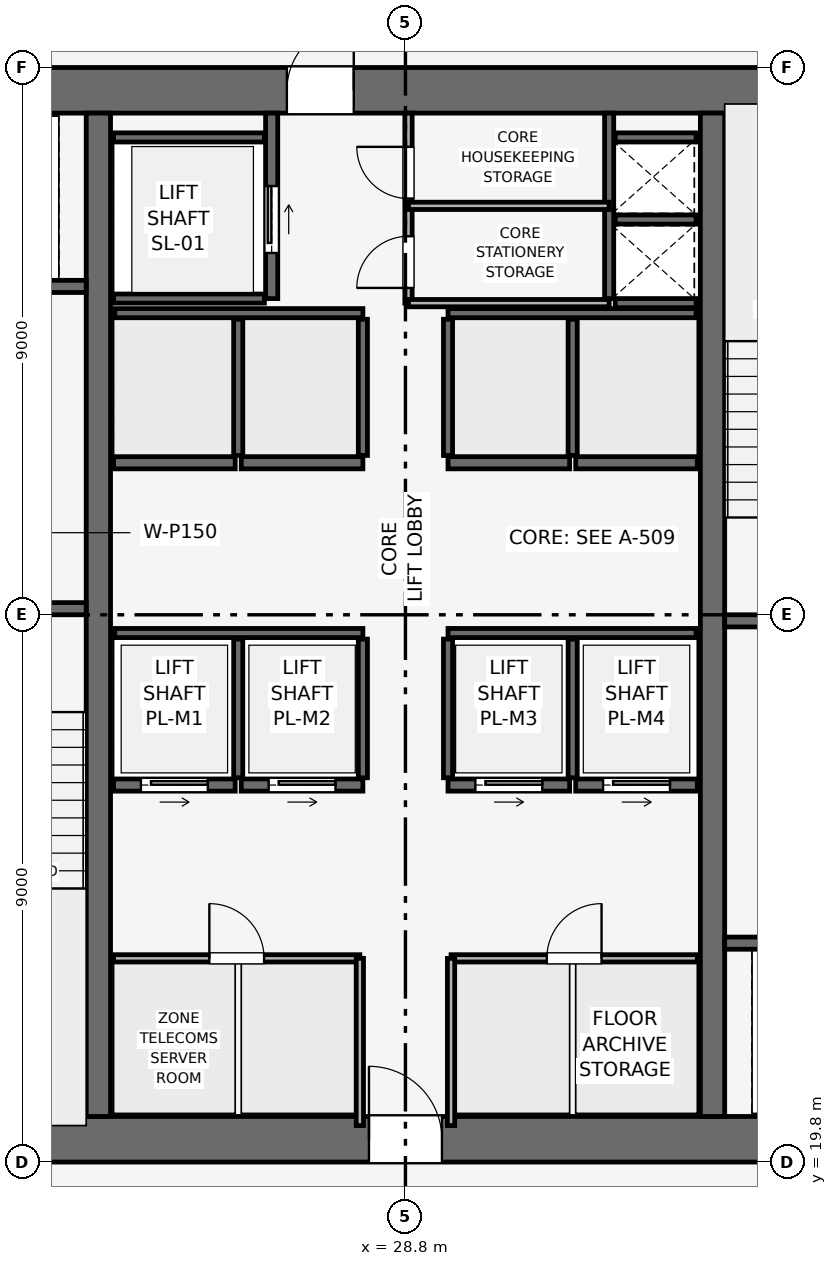
"""IFC4 building model, lengths in metres.
Left out: names, types, materials, properties, quantities, classifications, styles, units other than length and angle.
Written with IfcOpenShell. Run it as: python <this file> out.ifc"""

import sys

from ifc_helpers import new_model, si_unit, direction, frame, frame_2d, origin, place, context, subcontext, project, spatial, rectangle, extrude, element, fill, save


model = new_model("IFC4")
c1 = context("Model", 3, precision=1e-05, world=origin(), true_north=direction((0.0, 1.0)))
c2 = subcontext(c1, "Body", "Model", "MODEL_VIEW")
j1 = project(units=[si_unit("LENGTHUNIT", "METRE"), si_unit("PLANEANGLEUNIT", "RADIAN")], contexts=[c1])
p1 = place(None, origin())
s1 = spatial("IfcSite", under=j1, at=p1, CompositionType="ELEMENT")
p2 = place(p1, origin())
s2 = spatial("IfcBuilding", under=s1, at=p2, CompositionType="ELEMENT")
p3 = place(p2, frame((0.0, 0.0, 199.95)))
s3 = spatial("IfcBuildingStorey", under=s2, at=p3, CompositionType="ELEMENT", Elevation=199.95)
p4 = place(p3, frame((19.8, 20.175, 0.0), z_axis=(0.0, 0.0, 1.0), x_axis=(1.0, 0.0, 0.0)))
e1 = element("IfcWall", 1, at=p4, inside=s3, PredefinedType="SHEAR", context=c2, shape_type="SweptSolid", body=[
    extrude(rectangle(XDim=18.0, YDim=0.75, at=frame_2d((9.0, 0.0))), origin(), (0.0, 0.0, 1.0), 3.75),
])
p5 = place(p4, frame((8.4, 0.0, 0.0)))
e2 = element("IfcOpeningElement", 2, at=p5, cuts=e1, PredefinedType="OPENING", context=c2, shape_type="SweptSolid", body=[
    extrude(rectangle(XDim=1.2, YDim=2.2, at=frame_2d((0.6, 1.1))), frame((0.0, 0.385, 0.0), z_axis=(0.0, -1.0, 0.0), x_axis=(1.0, 0.0, 0.0)), (0.0, 0.0, 1.0), 0.77),
])
p6 = place(p3, frame((19.8, 37.425, 0.0), z_axis=(0.0, 0.0, 1.0), x_axis=(1.0, 0.0, 0.0)))
e3 = element("IfcWall", 3, at=p6, inside=s3, PredefinedType="SHEAR", context=c2, shape_type="SweptSolid", body=[
    extrude(rectangle(XDim=18.0, YDim=0.75, at=frame_2d((9.0, 0.0))), origin(), (0.0, 0.0, 1.0), 3.75),
])
p7 = place(p6, frame((7.05, 0.0, 0.0)))
e4 = element("IfcOpeningElement", 4, at=p7, cuts=e3, PredefinedType="OPENING", context=c2, shape_type="SweptSolid", body=[
    extrude(rectangle(XDim=1.1, YDim=2.15, at=frame_2d((0.55, 1.075))), frame((0.0, 0.385, 0.0), z_axis=(0.0, -1.0, 0.0), x_axis=(1.0, 0.0, 0.0)), (0.0, 0.0, 1.0), 0.77),
])
for number, where, z_axis, x_axis in (
    (5, (23.75, 20.55, 0.0), (0.0, 0.0, 1.0), (0.0, 1.0, 0.0)),
    (6, (33.85, 20.55, 0.0), (0.0, 0.0, 1.0), (0.0, 1.0, 0.0)),
):
    element("IfcWall", number, at=place(p3, frame(where, z_axis=z_axis, x_axis=x_axis)), inside=s3, PredefinedType="SHEAR", context=c2, shape_type="SweptSolid", body=[
        extrude(rectangle(XDim=16.5, YDim=0.4, at=frame_2d((8.25, 0.0))), origin(), (0.0, 0.0, 1.0), 3.75),
    ])
p8 = place(p3, frame((20.4, 28.9, 0.0), z_axis=(0.0, 0.0, 1.0), x_axis=(1.0, 0.0, 0.0)))
e7 = element("IfcWall", 7, at=p8, inside=s3, PredefinedType="SHEAR", context=c2, shape_type="SweptSolid", body=[
    extrude(rectangle(XDim=3.15, YDim=0.2, at=frame_2d((1.575, 0.0))), origin(), (0.0, 0.0, 1.0), 3.5),
])
p9 = place(p8, frame((0.8, 0.0, 0.0)))
e8 = element("IfcOpeningElement", 8, at=p9, cuts=e7, PredefinedType="OPENING", context=c2, shape_type="SweptSolid", body=[
    extrude(rectangle(XDim=1.0, YDim=2.1, at=frame_2d((0.5, 1.05))), frame((0.0, 0.11, 0.0), z_axis=(0.0, -1.0, 0.0), x_axis=(1.0, 0.0, 0.0)), (0.0, 0.0, 1.0), 0.22),
])
p10 = place(p3, frame((34.05, 28.7, 0.0), z_axis=(0.0, 0.0, 1.0), x_axis=(1.0, 0.0, 0.0)))
e9 = element("IfcWall", 9, at=p10, inside=s3, PredefinedType="SHEAR", context=c2, shape_type="SweptSolid", body=[
    extrude(rectangle(XDim=3.15, YDim=0.2, at=frame_2d((1.575, 0.0))), origin(), (0.0, 0.0, 1.0), 3.5),
])
p11 = place(p10, frame((0.8, 0.0, 0.0)))
e10 = element("IfcOpeningElement", 10, at=p11, cuts=e9, PredefinedType="OPENING", context=c2, shape_type="SweptSolid", body=[
    extrude(rectangle(XDim=1.0, YDim=2.1, at=frame_2d((0.5, 1.05))), frame((0.0, 0.11, 0.0), z_axis=(0.0, -1.0, 0.0), x_axis=(1.0, 0.0, 0.0)), (0.0, 0.0, 1.0), 0.22),
])
p12 = place(p3, frame((32.15, 34.0, 0.0), z_axis=(0.0, 0.0, 1.0), x_axis=(0.0, 1.0, 0.0)))
e11 = element("IfcWall", 11, at=p12, inside=s3, PredefinedType="SHEAR", context=c2, shape_type="SweptSolid", body=[
    extrude(rectangle(XDim=3.05, YDim=0.15, at=frame_2d((1.525, 0.0))), origin(), (0.0, 0.0, 1.0), 3.5),
])
for number, where, z_axis, x_axis in (
    (12, (32.25, 33.925, 0.0), (0.0, 0.0, 1.0), (1.0, 0.0, 0.0)),
    (13, (32.25, 35.3, 0.0), (0.0, 0.0, 1.0), (1.0, 0.0, 0.0)),
):
    element("IfcWall", number, at=place(p3, frame(where, z_axis=z_axis, x_axis=x_axis)), inside=s3, PredefinedType="SHEAR", context=c2, shape_type="SweptSolid", body=[
        extrude(rectangle(XDim=1.33, YDim=0.15, at=frame_2d((0.665, 0.0))), origin(), (0.0, 0.0, 1.0), 3.5),
    ])
p13 = place(p3, frame((20.5, 34.2, 0.0), z_axis=(0.0, 0.0, 1.0), x_axis=(1.0, 0.0, 0.0)))
e14 = element("IfcWall", 14, at=p13, inside=s3, PredefinedType="SHEAR", context=c2, shape_type="SweptSolid", body=[
    extrude(rectangle(XDim=3.05, YDim=0.2, at=frame_2d((1.525, 0.0))), origin(), (0.0, 0.0, 1.0), 3.5),
])
p14 = place(p13, frame((0.75, 0.0, 0.0)))
e15 = element("IfcOpeningElement", 15, at=p14, cuts=e14, PredefinedType="OPENING", context=c2, shape_type="SweptSolid", body=[
    extrude(rectangle(XDim=1.1, YDim=2.15, at=frame_2d((0.55, 1.075))), frame((0.0, 0.11, 0.0), z_axis=(0.0, -1.0, 0.0), x_axis=(1.0, 0.0, 0.0)), (0.0, 0.0, 1.0), 0.22),
])
p15 = place(p3, frame((34.05, 23.4, 0.0), z_axis=(0.0, 0.0, 1.0), x_axis=(1.0, 0.0, 0.0)))
e16 = element("IfcWall", 16, at=p15, inside=s3, PredefinedType="SHEAR", context=c2, shape_type="SweptSolid", body=[
    extrude(rectangle(XDim=3.05, YDim=0.2, at=frame_2d((1.525, 0.0))), origin(), (0.0, 0.0, 1.0), 3.5),
])
p16 = place(p15, frame((1.2, 0.0, 0.0)))
e17 = element("IfcOpeningElement", 17, at=p16, cuts=e16, PredefinedType="OPENING", context=c2, shape_type="SweptSolid", body=[
    extrude(rectangle(XDim=1.1, YDim=2.15, at=frame_2d((0.55, 1.075))), frame((0.0, 0.11, 0.0), z_axis=(0.0, -1.0, 0.0), x_axis=(1.0, 0.0, 0.0)), (0.0, 0.0, 1.0), 0.22),
])
p17 = place(p3, frame((26.6, 34.0, 0.0), z_axis=(0.0, 0.0, 1.0), x_axis=(0.0, 1.0, 0.0)))
e18 = element("IfcWall", 18, at=p17, inside=s3, PredefinedType="SHEAR", context=c2, shape_type="SweptSolid", body=[
    extrude(rectangle(XDim=3.05, YDim=0.2, at=frame_2d((1.525, 0.0))), origin(), (0.0, 0.0, 1.0), 3.5),
])
p18 = place(p17, frame((0.75, 0.0, 0.0)))
e19 = element("IfcOpeningElement", 19, at=p18, cuts=e18, PredefinedType="OPENING", context=c2, shape_type="SweptSolid", body=[
    extrude(rectangle(XDim=1.1, YDim=2.15, at=frame_2d((0.55, 1.075))), frame((0.0, 0.11, 0.0), z_axis=(0.0, -1.0, 0.0), x_axis=(1.0, 0.0, 0.0)), (0.0, 0.0, 1.0), 0.22),
])
for number, where, z_axis, x_axis in (
    (20, (24.0, 34.0, 0.0), (0.0, 0.0, 1.0), (1.0, 0.0, 0.0)),
    (21, (24.0, 36.65, 0.0), (0.0, 0.0, 1.0), (1.0, 0.0, 0.0)),
):
    element("IfcWall", number, at=place(p3, frame(where, z_axis=z_axis, x_axis=x_axis)), inside=s3, PredefinedType="SHEAR", context=c2, shape_type="SweptSolid", body=[
        extrude(rectangle(XDim=2.48, YDim=0.15, at=frame_2d((1.24, 0.0))), origin(), (0.0, 0.0, 1.0), 3.5),
    ])
p19 = place(p3, frame((24.0, 26.0, 0.0), z_axis=(0.0, 0.0, 1.0), x_axis=(1.0, 0.0, 0.0)))
e22 = element("IfcWall", 22, at=p19, inside=s3, PredefinedType="SHEAR", context=c2, shape_type="SweptSolid", body=[
    extrude(rectangle(XDim=2.0, YDim=0.2, at=frame_2d((1.0, 0.0))), origin(), (0.0, 0.0, 1.0), 3.5),
])
p20 = place(p19, frame((0.45, 0.0, 0.0)))
e23 = element("IfcOpeningElement", 23, at=p20, cuts=e22, PredefinedType="OPENING", context=c2, shape_type="SweptSolid", body=[
    extrude(rectangle(XDim=1.1, YDim=2.15, at=frame_2d((0.55, 1.075))), frame((0.0, 0.11, 0.0), z_axis=(0.0, -1.0, 0.0), x_axis=(1.0, 0.0, 0.0)), (0.0, 0.0, 1.0), 0.22),
])
p21 = place(p3, frame((26.1, 26.0, 0.0), z_axis=(0.0, 0.0, 1.0), x_axis=(1.0, 0.0, 0.0)))
e24 = element("IfcWall", 24, at=p21, inside=s3, PredefinedType="SHEAR", context=c2, shape_type="SweptSolid", body=[
    extrude(rectangle(XDim=2.0, YDim=0.2, at=frame_2d((1.0, 0.0))), origin(), (0.0, 0.0, 1.0), 3.5),
])
p22 = place(p21, frame((0.45, 0.0, 0.0)))
e25 = element("IfcOpeningElement", 25, at=p22, cuts=e24, PredefinedType="OPENING", context=c2, shape_type="SweptSolid", body=[
    extrude(rectangle(XDim=1.1, YDim=2.15, at=frame_2d((0.55, 1.075))), frame((0.0, 0.11, 0.0), z_axis=(0.0, -1.0, 0.0), x_axis=(1.0, 0.0, 0.0)), (0.0, 0.0, 1.0), 0.22),
])
p23 = place(p3, frame((29.5, 26.0, 0.0), z_axis=(0.0, 0.0, 1.0), x_axis=(1.0, 0.0, 0.0)))
e26 = element("IfcWall", 26, at=p23, inside=s3, PredefinedType="SHEAR", context=c2, shape_type="SweptSolid", body=[
    extrude(rectangle(XDim=2.0, YDim=0.2, at=frame_2d((1.0, 0.0))), origin(), (0.0, 0.0, 1.0), 3.5),
])
p24 = place(p23, frame((0.45, 0.0, 0.0)))
e27 = element("IfcOpeningElement", 27, at=p24, cuts=e26, PredefinedType="OPENING", context=c2, shape_type="SweptSolid", body=[
    extrude(rectangle(XDim=1.1, YDim=2.15, at=frame_2d((0.55, 1.075))), frame((0.0, 0.11, 0.0), z_axis=(0.0, -1.0, 0.0), x_axis=(1.0, 0.0, 0.0)), (0.0, 0.0, 1.0), 0.22),
])
p25 = place(p3, frame((31.6, 26.0, 0.0), z_axis=(0.0, 0.0, 1.0), x_axis=(1.0, 0.0, 0.0)))
e28 = element("IfcWall", 28, at=p25, inside=s3, PredefinedType="SHEAR", context=c2, shape_type="SweptSolid", body=[
    extrude(rectangle(XDim=2.0, YDim=0.2, at=frame_2d((1.0, 0.0))), origin(), (0.0, 0.0, 1.0), 3.5),
])
p26 = place(p25, frame((0.45, 0.0, 0.0)))
e29 = element("IfcOpeningElement", 29, at=p26, cuts=e28, PredefinedType="OPENING", context=c2, shape_type="SweptSolid", body=[
    extrude(rectangle(XDim=1.1, YDim=2.15, at=frame_2d((0.55, 1.075))), frame((0.0, 0.11, 0.0), z_axis=(0.0, -1.0, 0.0), x_axis=(1.0, 0.0, 0.0)), (0.0, 0.0, 1.0), 0.22),
])
for number, where, z_axis, x_axis in (
    (30, (24.0, 31.3, 0.0), (0.0, 0.0, 1.0), (1.0, 0.0, 0.0)),
    (31, (26.1, 31.3, 0.0), (0.0, 0.0, 1.0), (1.0, 0.0, 0.0)),
    (32, (29.5, 31.3, 0.0), (0.0, 0.0, 1.0), (1.0, 0.0, 0.0)),
    (33, (31.6, 31.3, 0.0), (0.0, 0.0, 1.0), (1.0, 0.0, 0.0)),
):
    element("IfcWall", number, at=place(p3, frame(where, z_axis=z_axis, x_axis=x_axis)), inside=s3, PredefinedType="SHEAR", context=c2, shape_type="SweptSolid", body=[
        extrude(rectangle(XDim=2.0, YDim=0.2, at=frame_2d((1.0, 0.0))), origin(), (0.0, 0.0, 1.0), 3.5),
    ])
p27 = place(p3, frame((32.25, 36.65, 0.0), z_axis=(0.0, 0.0, 1.0), x_axis=(1.0, 0.0, 0.0)))
e34 = element("IfcWall", 34, at=p27, inside=s3, PredefinedType="SHEAR", context=c2, shape_type="SweptSolid", body=[
    extrude(rectangle(XDim=1.33, YDim=0.15, at=frame_2d((0.665, 0.0))), origin(), (0.0, 0.0, 1.0), 3.5),
])
for number, where, z_axis, x_axis in (
    (35, (24.02, 28.5, 0.0), (0.0, 0.0, 1.0), (1.0, 0.0, 0.0)),
    (36, (29.5, 28.5, 0.0), (0.0, 0.0, 1.0), (1.0, 0.0, 0.0)),
):
    element("IfcWall", number, at=place(p3, frame(where, z_axis=z_axis, x_axis=x_axis)), inside=s3, PredefinedType="SHEAR", context=c2, shape_type="SweptSolid", body=[
        extrude(rectangle(XDim=4.08, YDim=0.15, at=frame_2d((2.04, 0.0))), origin(), (0.0, 0.0, 1.0), 3.5),
    ])
for number, where, z_axis, x_axis in (
    (37, (26.05, 26.12, 0.0), (0.0, 0.0, 1.0), (0.0, 1.0, 0.0)),
    (38, (28.1, 26.12, 0.0), (0.0, 0.0, 1.0), (0.0, 1.0, 0.0)),
    (39, (29.5, 26.12, 0.0), (0.0, 0.0, 1.0), (0.0, 1.0, 0.0)),
    (40, (31.55, 26.12, 0.0), (0.0, 0.0, 1.0), (0.0, 1.0, 0.0)),
):
    element("IfcWall", number, at=place(p3, frame(where, z_axis=z_axis, x_axis=x_axis)), inside=s3, PredefinedType="SHEAR", context=c2, shape_type="SweptSolid", body=[
        extrude(rectangle(XDim=2.28, YDim=0.15, at=frame_2d((1.14, 0.0))), origin(), (0.0, 0.0, 1.0), 3.5),
    ])
for number, where, z_axis, x_axis in (
    (41, (24.02, 33.76, 0.0), (0.0, 0.0, 1.0), (1.0, 0.0, 0.0)),
    (42, (29.5, 33.76, 0.0), (0.0, 0.0, 1.0), (1.0, 0.0, 0.0)),
):
    element("IfcWall", number, at=place(p3, frame(where, z_axis=z_axis, x_axis=x_axis)), inside=s3, PredefinedType="SHEAR", context=c2, shape_type="SweptSolid", body=[
        extrude(rectangle(XDim=4.08, YDim=0.15, at=frame_2d((2.04, 0.0))), origin(), (0.0, 0.0, 1.0), 3.5),
    ])
for number, where, z_axis, x_axis in (
    (43, (26.05, 31.42, 0.0), (0.0, 0.0, 1.0), (0.0, 1.0, 0.0)),
    (44, (28.1, 31.42, 0.0), (0.0, 0.0, 1.0), (0.0, 1.0, 0.0)),
    (45, (29.5, 31.42, 0.0), (0.0, 0.0, 1.0), (0.0, 1.0, 0.0)),
    (46, (31.55, 31.42, 0.0), (0.0, 0.0, 1.0), (0.0, 1.0, 0.0)),
):
    element("IfcWall", number, at=place(p3, frame(where, z_axis=z_axis, x_axis=x_axis)), inside=s3, PredefinedType="SHEAR", context=c2, shape_type="SweptSolid", body=[
        extrude(rectangle(XDim=2.24, YDim=0.15, at=frame_2d((1.12, 0.0))), origin(), (0.0, 0.0, 1.0), 3.5),
    ])
p28 = place(p3, frame((28.85, 33.925, 0.0), z_axis=(0.0, 0.0, 1.0), x_axis=(0.0, 1.0, 0.0)))
e47 = element("IfcWall", 47, at=p28, inside=s3, PredefinedType="PARTITIONING", context=c2, shape_type="SweptSolid", body=[
    extrude(rectangle(XDim=3.125, YDim=0.12, at=frame_2d((1.562, 0.0))), origin(), (0.0, 0.0, 1.0), 3.5),
])
p29 = place(p28, frame((0.25, 0.0, 0.0)))
e48 = element("IfcOpeningElement", 48, at=p29, cuts=e47, PredefinedType="OPENING", context=c2, shape_type="SweptSolid", body=[
    extrude(rectangle(XDim=0.85, YDim=2.1, at=frame_2d((0.425, 1.05))), frame((0.0, 0.07, 0.0), z_axis=(0.0, -1.0, 0.0), x_axis=(1.0, 0.0, 0.0)), (0.0, 0.0, 1.0), 0.14),
])
p30 = place(p28, frame((1.72, 0.0, 0.0)))
e49 = element("IfcOpeningElement", 49, at=p30, cuts=e47, PredefinedType="OPENING", context=c2, shape_type="SweptSolid", body=[
    extrude(rectangle(XDim=0.85, YDim=2.1, at=frame_2d((0.425, 1.05))), frame((0.0, 0.07, 0.0), z_axis=(0.0, -1.0, 0.0), x_axis=(1.0, 0.0, 0.0)), (0.0, 0.0, 1.0), 0.14),
])
for number, where, z_axis, x_axis in (
    (50, (28.85, 35.525, 0.0), (0.0, 0.0, 1.0), (1.0, 0.0, 0.0)),
    (51, (28.85, 33.925, 0.0), (0.0, 0.0, 1.0), (1.0, 0.0, 0.0)),
):
    element("IfcWall", number, at=place(p3, frame(where, z_axis=z_axis, x_axis=x_axis)), inside=s3, PredefinedType="PARTITIONING", context=c2, shape_type="SweptSolid", body=[
        extrude(rectangle(XDim=3.3, YDim=0.12, at=frame_2d((1.65, 0.0))), origin(), (0.0, 0.0, 1.0), 3.5),
    ])
p31 = place(p3, frame((24.0, 23.15, 0.0), z_axis=(0.0, 0.0, 1.0), x_axis=(1.0, 0.0, 0.0)))
e52 = element("IfcWall", 52, at=p31, inside=s3, PredefinedType="PARTITIONING", context=c2, shape_type="SweptSolid", body=[
    extrude(rectangle(XDim=4.05, YDim=0.12, at=frame_2d((2.025, 0.0))), origin(), (0.0, 0.0, 1.0), 3.5),
])
p32 = place(p31, frame((1.575, 0.0, 0.0)))
e53 = element("IfcOpeningElement", 53, at=p32, cuts=e52, PredefinedType="OPENING", context=c2, shape_type="SweptSolid", body=[
    extrude(rectangle(XDim=0.9, YDim=2.1, at=frame_2d((0.45, 1.05))), frame((0.0, 0.07, 0.0), z_axis=(0.0, -1.0, 0.0), x_axis=(1.0, 0.0, 0.0)), (0.0, 0.0, 1.0), 0.14),
])
p33 = place(p3, frame((28.05, 20.4, 0.0), z_axis=(0.0, 0.0, 1.0), x_axis=(0.0, 1.0, 0.0)))
e54 = element("IfcWall", 54, at=p33, inside=s3, PredefinedType="PARTITIONING", context=c2, shape_type="SweptSolid", body=[
    extrude(rectangle(XDim=2.75, YDim=0.12, at=frame_2d((1.375, 0.0))), origin(), (0.0, 0.0, 1.0), 3.5),
])
p34 = place(p3, frame((29.55, 23.15, 0.0), z_axis=(0.0, 0.0, 1.0), x_axis=(1.0, 0.0, 0.0)))
e55 = element("IfcWall", 55, at=p34, inside=s3, PredefinedType="PARTITIONING", context=c2, shape_type="SweptSolid", body=[
    extrude(rectangle(XDim=4.05, YDim=0.12, at=frame_2d((2.025, 0.0))), origin(), (0.0, 0.0, 1.0), 3.5),
])
p35 = place(p34, frame((1.575, 0.0, 0.0)))
e56 = element("IfcOpeningElement", 56, at=p35, cuts=e55, PredefinedType="OPENING", context=c2, shape_type="SweptSolid", body=[
    extrude(rectangle(XDim=0.9, YDim=2.1, at=frame_2d((0.45, 1.05))), frame((0.0, 0.07, 0.0), z_axis=(0.0, -1.0, 0.0), x_axis=(1.0, 0.0, 0.0)), (0.0, 0.0, 1.0), 0.14),
])
p36 = place(p3, frame((29.55, 20.4, 0.0), z_axis=(0.0, 0.0, 1.0), x_axis=(0.0, 1.0, 0.0)))
e57 = element("IfcWall", 57, at=p36, inside=s3, PredefinedType="PARTITIONING", context=c2, shape_type="SweptSolid", body=[
    extrude(rectangle(XDim=2.75, YDim=0.12, at=frame_2d((1.375, 0.0))), origin(), (0.0, 0.0, 1.0), 3.5),
])
p37 = place(p18, origin())
e58 = element("IfcDoor", 58, at=p37, inside=s3, OperationType="SLIDING_TO_RIGHT", PredefinedType="DOOR", context=c2, shape_type="SweptSolid", body=[
    extrude(rectangle(XDim=1.1, YDim=2.15, at=frame_2d((0.55, 1.075))), frame((0.0, 0.025, 0.0), z_axis=(0.0, -1.0, 0.0), x_axis=(1.0, 0.0, 0.0)), (0.0, 0.0, 1.0), 0.05),
])
fill(e19, e58)
p38 = place(p20, origin())
e59 = element("IfcDoor", 59, at=p38, inside=s3, OperationType="SLIDING_TO_RIGHT", PredefinedType="DOOR", context=c2, shape_type="SweptSolid", body=[
    extrude(rectangle(XDim=1.1, YDim=2.15, at=frame_2d((0.55, 1.075))), frame((0.0, 0.025, 0.0), z_axis=(0.0, -1.0, 0.0), x_axis=(1.0, 0.0, 0.0)), (0.0, 0.0, 1.0), 0.05),
])
fill(e23, e59)
p39 = place(p22, origin())
e60 = element("IfcDoor", 60, at=p39, inside=s3, OperationType="SLIDING_TO_RIGHT", PredefinedType="DOOR", context=c2, shape_type="SweptSolid", body=[
    extrude(rectangle(XDim=1.1, YDim=2.15, at=frame_2d((0.55, 1.075))), frame((0.0, 0.025, 0.0), z_axis=(0.0, -1.0, 0.0), x_axis=(1.0, 0.0, 0.0)), (0.0, 0.0, 1.0), 0.05),
])
fill(e25, e60)
p40 = place(p24, origin())
e61 = element("IfcDoor", 61, at=p40, inside=s3, OperationType="SLIDING_TO_RIGHT", PredefinedType="DOOR", context=c2, shape_type="SweptSolid", body=[
    extrude(rectangle(XDim=1.1, YDim=2.15, at=frame_2d((0.55, 1.075))), frame((0.0, 0.025, 0.0), z_axis=(0.0, -1.0, 0.0), x_axis=(1.0, 0.0, 0.0)), (0.0, 0.0, 1.0), 0.05),
])
fill(e27, e61)
p41 = place(p26, origin())
e62 = element("IfcDoor", 62, at=p41, inside=s3, OperationType="SLIDING_TO_RIGHT", PredefinedType="DOOR", context=c2, shape_type="SweptSolid", body=[
    extrude(rectangle(XDim=1.1, YDim=2.15, at=frame_2d((0.55, 1.075))), frame((0.0, 0.025, 0.0), z_axis=(0.0, -1.0, 0.0), x_axis=(1.0, 0.0, 0.0)), (0.0, 0.0, 1.0), 0.05),
])
fill(e29, e62)
p42 = place(p29, origin())
e63 = element("IfcDoor", 63, at=p42, inside=s3, OperationType="SINGLE_SWING_LEFT", PredefinedType="DOOR", context=c2, shape_type="SweptSolid", body=[
    extrude(rectangle(XDim=0.85, YDim=2.1, at=frame_2d((0.425, 1.05))), frame((0.0, 0.025, 0.0), z_axis=(0.0, -1.0, 0.0), x_axis=(1.0, 0.0, 0.0)), (0.0, 0.0, 1.0), 0.05),
])
fill(e48, e63)
p43 = place(p30, origin())
e64 = element("IfcDoor", 64, at=p43, inside=s3, OperationType="SINGLE_SWING_RIGHT", PredefinedType="DOOR", context=c2, shape_type="SweptSolid", body=[
    extrude(rectangle(XDim=0.85, YDim=2.1, at=frame_2d((0.425, 1.05))), frame((0.0, 0.025, 0.0), z_axis=(0.0, -1.0, 0.0), x_axis=(1.0, 0.0, 0.0)), (0.0, 0.0, 1.0), 0.05),
])
fill(e49, e64)
p44 = place(p32, origin())
e65 = element("IfcDoor", 65, at=p44, inside=s3, OperationType="SINGLE_SWING_LEFT", PredefinedType="DOOR", context=c2, shape_type="SweptSolid", body=[
    extrude(rectangle(XDim=0.9, YDim=2.1, at=frame_2d((0.45, 1.05))), frame((0.0, 0.025, 0.0), z_axis=(0.0, -1.0, 0.0), x_axis=(1.0, 0.0, 0.0)), (0.0, 0.0, 1.0), 0.05),
])
fill(e53, e65)
p45 = place(p35, origin())
e66 = element("IfcDoor", 66, at=p45, inside=s3, OperationType="SINGLE_SWING_RIGHT", PredefinedType="DOOR", context=c2, shape_type="SweptSolid", body=[
    extrude(rectangle(XDim=0.9, YDim=2.1, at=frame_2d((0.45, 1.05))), frame((0.0, 0.025, 0.0), z_axis=(0.0, -1.0, 0.0), x_axis=(1.0, 0.0, 0.0)), (0.0, 0.0, 1.0), 0.05),
])
fill(e56, e66)
p46 = place(p5, origin())
e67 = element("IfcDoor", 67, at=p46, inside=s3, OperationType="SINGLE_SWING_LEFT", PredefinedType="DOOR", context=c2, shape_type="SweptSolid", body=[
    extrude(rectangle(XDim=1.2, YDim=2.2, at=frame_2d((0.6, 1.1))), frame((0.0, 0.025, 0.0), z_axis=(0.0, -1.0, 0.0), x_axis=(1.0, 0.0, 0.0)), (0.0, 0.0, 1.0), 0.05),
])
fill(e2, e67)
p47 = place(p7, origin())
e68 = element("IfcDoor", 68, at=p47, inside=s3, OperationType="SINGLE_SWING_RIGHT", PredefinedType="DOOR", context=c2, shape_type="SweptSolid", body=[
    extrude(rectangle(XDim=1.1, YDim=2.15, at=frame_2d((0.55, 1.075))), frame((0.0, 0.025, 0.0), z_axis=(0.0, -1.0, 0.0), x_axis=(1.0, 0.0, 0.0)), (0.0, 0.0, 1.0), 0.05),
])
fill(e4, e68)
save(model, sys.argv[1])
